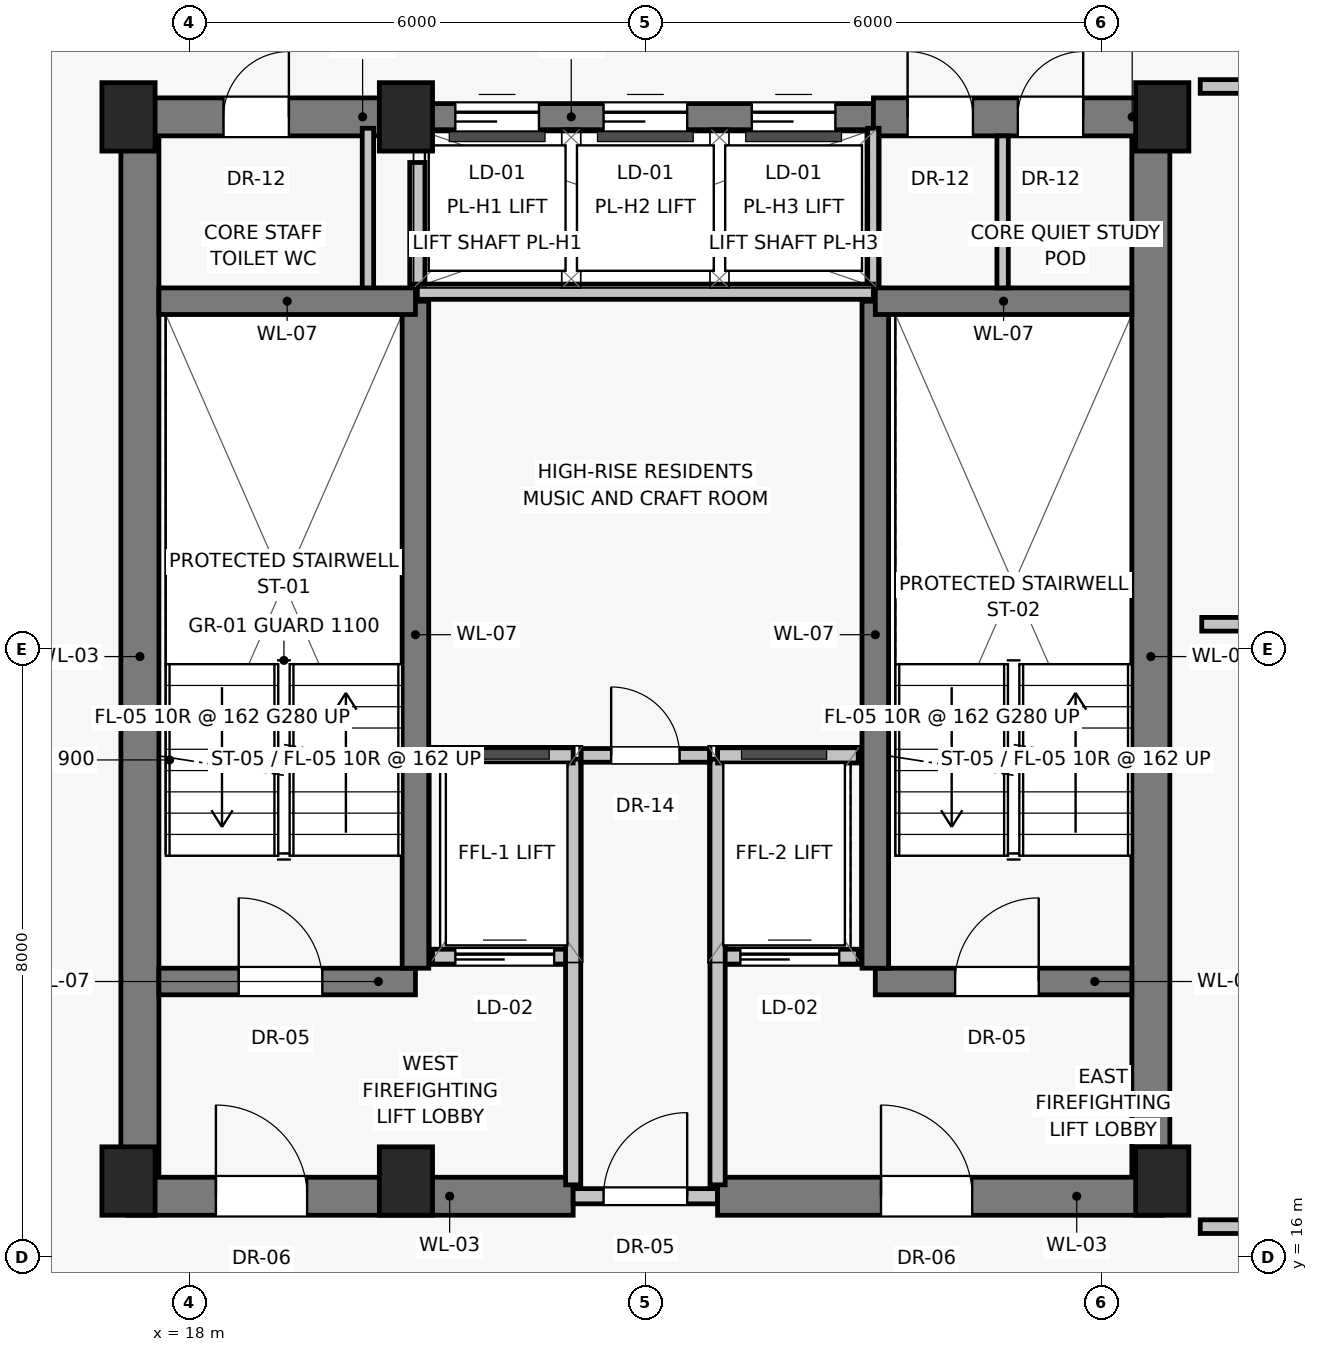
"""IFC4 building model, lengths in metres.
Left out: names, types, materials, properties, quantities, classifications, styles, units other than length and angle.
Written with IfcOpenShell. Run it as: python <this file> out.ifc"""

import sys

from ifc_helpers import new_model, si_unit, direction, frame, frame_2d, origin, origin_2d, place, context, subcontext, project, spatial, rectangle, extrude, source, transform, mapped, element, fill, save


model = new_model("IFC4")
c1 = context("Model", 3, precision=1e-05, world=origin(), true_north=direction((0.0, 1.0)))
c2 = subcontext(c1, "Body", "Model", "MODEL_VIEW")
j1 = project(units=[si_unit("LENGTHUNIT", "METRE"), si_unit("PLANEANGLEUNIT", "RADIAN")], contexts=[c1])
p1 = place(None, origin())
s1 = spatial("IfcSite", under=j1, at=p1, CompositionType="ELEMENT")
p2 = place(p1, origin())
s2 = spatial("IfcBuilding", under=s1, at=p2, CompositionType="ELEMENT")
p3 = place(p2, frame((0.0, 0.0, 185.35)))
s3 = spatial("IfcBuildingStorey", under=s2, at=p3, CompositionType="ELEMENT", Elevation=185.35)
for number, where, z_axis, x_axis in (
    (1, (17.2, 17.0, 0.0), (0.0, 0.0, 1.0), (1.0, 0.0, 0.0)),
    (2, (20.85, 17.0, 0.0), (0.0, 0.0, 1.0), (1.0, 0.0, 0.0)),
    (3, (30.8, 17.0, 0.0), (0.0, 0.0, 1.0), (1.0, 0.0, 0.0)),
    (4, (17.2, 31.0, 0.0), (0.0, 0.0, 1.0), (1.0, 0.0, 0.0)),
    (5, (20.85, 31.0, 0.0), (0.0, 0.0, 1.0), (1.0, 0.0, 0.0)),
    (6, (30.8, 31.0, 0.0), (0.0, 0.0, 1.0), (1.0, 0.0, 0.0)),
):
    element("IfcColumn", number, at=place(p3, frame(where, z_axis=z_axis, x_axis=x_axis)), inside=s3, PredefinedType="PILASTER", context=c2, shape_type="SweptSolid", body=[
        extrude(rectangle(XDim=0.7, YDim=0.9, at=origin_2d()), origin(), (0.0, 0.0, 1.0), 3.25),
    ])
for number, where, z_axis, x_axis in (
    (7, (17.35, 16.8, 0.0), (0.0, 0.0, 1.0), (0.0, 1.0, 0.0)),
    (8, (30.65, 16.8, 0.0), (0.0, 0.0, 1.0), (0.0, 1.0, 0.0)),
):
    element("IfcWall", number, at=place(p3, frame(where, z_axis=z_axis, x_axis=x_axis)), inside=s3, PredefinedType="SHEAR", context=c2, shape_type="SweptSolid", body=[
        extrude(rectangle(XDim=14.2, YDim=0.5, at=frame_2d((7.1, 0.0))), origin(), (0.0, 0.0, 1.0), 3.015),
    ])
p4 = place(p3, frame((17.2, 16.8, 0.0), z_axis=(0.0, 0.0, 1.0), x_axis=(1.0, 0.0, 0.0)))
e9 = element("IfcWall", 9, at=p4, inside=s3, PredefinedType="SHEAR", context=c2, shape_type="SweptSolid", body=[
    extrude(rectangle(XDim=5.85, YDim=0.5, at=frame_2d((2.925, 0.0))), origin(), (0.0, 0.0, 1.0), 3.015),
])
p5 = place(p4, frame((1.15, 0.0, 0.0)))
e10 = element("IfcOpeningElement", 10, at=p5, cuts=e9, PredefinedType="OPENING", context=c2, shape_type="SweptSolid", body=[
    extrude(rectangle(XDim=1.2, YDim=2.03, at=frame_2d((0.6, 1.015))), frame((0.0, 0.26, 0.0), z_axis=(0.0, -1.0, 0.0), x_axis=(1.0, 0.0, 0.0)), (0.0, 0.0, 1.0), 0.52),
])
p6 = place(p3, frame((23.05, 16.8, 0.0), z_axis=(0.0, 0.0, 1.0), x_axis=(1.0, 0.0, 0.0)))
e11 = element("IfcWall", 11, at=p6, inside=s3, PredefinedType="SOLIDWALL", context=c2, shape_type="SweptSolid", body=[
    extrude(rectangle(XDim=1.9, YDim=0.2, at=frame_2d((0.95, 0.0))), origin(), (0.0, 0.0, 1.0), 2.165),
])
p7 = place(p6, frame((0.4, 0.0, 0.0)))
e12 = element("IfcOpeningElement", 12, at=p7, cuts=e11, PredefinedType="OPENING", context=c2, shape_type="SweptSolid", body=[
    extrude(rectangle(XDim=1.1, YDim=2.03, at=frame_2d((0.55, 1.015))), frame((0.0, 0.11, 0.0), z_axis=(0.0, -1.0, 0.0), x_axis=(1.0, 0.0, 0.0)), (0.0, 0.0, 1.0), 0.22),
])
p8 = place(p3, frame((24.95, 16.8, 0.0), z_axis=(0.0, 0.0, 1.0), x_axis=(1.0, 0.0, 0.0)))
e13 = element("IfcWall", 13, at=p8, inside=s3, PredefinedType="SHEAR", context=c2, shape_type="SweptSolid", body=[
    extrude(rectangle(XDim=5.85, YDim=0.5, at=frame_2d((2.925, 0.0))), origin(), (0.0, 0.0, 1.0), 3.015),
])
p9 = place(p8, frame((2.15, 0.0, 0.0)))
e14 = element("IfcOpeningElement", 14, at=p9, cuts=e13, PredefinedType="OPENING", context=c2, shape_type="SweptSolid", body=[
    extrude(rectangle(XDim=1.2, YDim=2.03, at=frame_2d((0.6, 1.015))), frame((0.0, 0.26, 0.0), z_axis=(0.0, -1.0, 0.0), x_axis=(1.0, 0.0, 0.0)), (0.0, 0.0, 1.0), 0.52),
])
p10 = place(p3, frame((17.2, 31.0, 0.0), z_axis=(0.0, 0.0, 1.0), x_axis=(1.0, 0.0, 0.0)))
e15 = element("IfcWall", 15, at=p10, inside=s3, PredefinedType="SHEAR", context=c2, shape_type="SweptSolid", body=[
    extrude(rectangle(XDim=3.8, YDim=0.5, at=frame_2d((1.9, 0.0))), origin(), (0.0, 0.0, 1.0), 3.015),
])
p11 = place(p10, frame((1.25, 0.0, 0.0)))
e16 = element("IfcOpeningElement", 16, at=p11, cuts=e15, PredefinedType="OPENING", context=c2, shape_type="SweptSolid", body=[
    extrude(rectangle(XDim=0.86, YDim=2.01, at=frame_2d((0.43, 1.005))), frame((0.0, 0.26, 0.0), z_axis=(0.0, -1.0, 0.0), x_axis=(1.0, 0.0, 0.0)), (0.0, 0.0, 1.0), 0.52),
])
p12 = place(p3, frame((21.0, 31.0, 0.0), z_axis=(0.0, 0.0, 1.0), x_axis=(1.0, 0.0, 0.0)))
e17 = element("IfcWall", 17, at=p12, inside=s3, PredefinedType="SHEAR", context=c2, shape_type="SweptSolid", body=[
    extrude(rectangle(XDim=6.0, YDim=0.35, at=frame_2d((3.0, 0.0))), origin(), (0.0, 0.0, 1.0), 3.015),
])
p13 = place(p12, frame((0.5, 0.0, 0.0)))
e18 = element("IfcOpeningElement", 18, at=p13, cuts=e17, PredefinedType="OPENING", context=c2, shape_type="SweptSolid", body=[
    extrude(rectangle(XDim=1.1, YDim=2.08, at=frame_2d((0.55, 1.04))), frame((0.0, 0.185, 0.0), z_axis=(0.0, -1.0, 0.0), x_axis=(1.0, 0.0, 0.0)), (0.0, 0.0, 1.0), 0.37),
])
p14 = place(p12, frame((2.45, 0.0, 0.0)))
e19 = element("IfcOpeningElement", 19, at=p14, cuts=e17, PredefinedType="OPENING", context=c2, shape_type="SweptSolid", body=[
    extrude(rectangle(XDim=1.1, YDim=2.08, at=frame_2d((0.55, 1.04))), frame((0.0, 0.185, 0.0), z_axis=(0.0, -1.0, 0.0), x_axis=(1.0, 0.0, 0.0)), (0.0, 0.0, 1.0), 0.37),
])
p15 = place(p12, frame((4.4, 0.0, 0.0)))
e20 = element("IfcOpeningElement", 20, at=p15, cuts=e17, PredefinedType="OPENING", context=c2, shape_type="SweptSolid", body=[
    extrude(rectangle(XDim=1.1, YDim=2.08, at=frame_2d((0.55, 1.04))), frame((0.0, 0.185, 0.0), z_axis=(0.0, -1.0, 0.0), x_axis=(1.0, 0.0, 0.0)), (0.0, 0.0, 1.0), 0.37),
])
p16 = place(p3, frame((27.0, 31.0, 0.0), z_axis=(0.0, 0.0, 1.0), x_axis=(1.0, 0.0, 0.0)))
e21 = element("IfcWall", 21, at=p16, inside=s3, PredefinedType="SHEAR", context=c2, shape_type="SweptSolid", body=[
    extrude(rectangle(XDim=3.8, YDim=0.5, at=frame_2d((1.9, 0.0))), origin(), (0.0, 0.0, 1.0), 3.015),
])
p17 = place(p16, frame((0.45, 0.0, 0.0)))
e22 = element("IfcOpeningElement", 22, at=p17, cuts=e21, PredefinedType="OPENING", context=c2, shape_type="SweptSolid", body=[
    extrude(rectangle(XDim=0.86, YDim=2.01, at=frame_2d((0.43, 1.005))), frame((0.0, 0.26, 0.0), z_axis=(0.0, -1.0, 0.0), x_axis=(1.0, 0.0, 0.0)), (0.0, 0.0, 1.0), 0.52),
])
p18 = place(p16, frame((1.9, 0.0, 0.0)))
e23 = element("IfcOpeningElement", 23, at=p18, cuts=e21, PredefinedType="OPENING", context=c2, shape_type="SweptSolid", body=[
    extrude(rectangle(XDim=0.86, YDim=2.01, at=frame_2d((0.43, 1.005))), frame((0.0, 0.26, 0.0), z_axis=(0.0, -1.0, 0.0), x_axis=(1.0, 0.0, 0.0)), (0.0, 0.0, 1.0), 0.52),
])
for number, where, z_axis, x_axis in (
    (24, (20.35, 28.65, 0.0), (0.0, 0.0, 1.0), (0.0, 1.0, 0.0)),
    (25, (27.0, 28.65, 0.0), (0.0, 0.0, 1.0), (0.0, 1.0, 0.0)),
):
    element("IfcWall", number, at=place(p3, frame(where, z_axis=z_axis, x_axis=x_axis)), inside=s3, PredefinedType="PARTITIONING", context=c2, shape_type="SweptSolid", body=[
        extrude(rectangle(XDim=2.2, YDim=0.15, at=frame_2d((1.1, 0.0))), origin(), (0.0, 0.0, 1.0), 3.015),
    ])
p19 = place(p3, frame((17.6, 19.625, 0.0), z_axis=(0.0, 0.0, 1.0), x_axis=(1.0, 0.0, 0.0)))
e26 = element("IfcWall", 26, at=p19, inside=s3, PredefinedType="SHEAR", context=c2, shape_type="SweptSolid", body=[
    extrude(rectangle(XDim=3.375, YDim=0.35, at=frame_2d((1.688, 0.0))), origin(), (0.0, 0.0, 1.0), 3.015),
])
p20 = place(p19, frame((1.05, 0.0, 0.0)))
e27 = element("IfcOpeningElement", 27, at=p20, cuts=e26, PredefinedType="OPENING", context=c2, shape_type="SweptSolid", body=[
    extrude(rectangle(XDim=1.1, YDim=2.03, at=frame_2d((0.55, 1.015))), frame((0.0, 0.185, 0.0), z_axis=(0.0, -1.0, 0.0), x_axis=(1.0, 0.0, 0.0)), (0.0, 0.0, 1.0), 0.37),
])
p21 = place(p3, frame((21.2, 19.95, 0.0), z_axis=(0.0, 0.0, 1.0), x_axis=(1.0, 0.0, 0.0)))
e28 = element("IfcWall", 28, at=p21, inside=s3, PredefinedType="SOLIDWALL", context=c2, shape_type="SweptSolid", body=[
    extrude(rectangle(XDim=1.85, YDim=0.2, at=frame_2d((0.925, 0.0))), origin(), (0.0, 0.0, 1.0), 3.015),
])
p22 = place(p21, frame((0.3, 0.0, 0.0)))
e29 = element("IfcOpeningElement", 29, at=p22, cuts=e28, PredefinedType="OPENING", context=c2, shape_type="SweptSolid", body=[
    extrude(rectangle(XDim=1.3, YDim=2.25, at=frame_2d((0.65, 1.125))), frame((0.0, 0.11, 0.0), z_axis=(0.0, -1.0, 0.0), x_axis=(1.0, 0.0, 0.0)), (0.0, 0.0, 1.0), 0.22),
])
p23 = place(p3, frame((24.95, 19.95, 0.0), z_axis=(0.0, 0.0, 1.0), x_axis=(1.0, 0.0, 0.0)))
e30 = element("IfcWall", 30, at=p23, inside=s3, PredefinedType="SOLIDWALL", context=c2, shape_type="SweptSolid", body=[
    extrude(rectangle(XDim=1.85, YDim=0.2, at=frame_2d((0.925, 0.0))), origin(), (0.0, 0.0, 1.0), 3.015),
])
p24 = place(p23, frame((0.3, 0.0, 0.0)))
e31 = element("IfcOpeningElement", 31, at=p24, cuts=e30, PredefinedType="OPENING", context=c2, shape_type="SweptSolid", body=[
    extrude(rectangle(XDim=1.3, YDim=2.25, at=frame_2d((0.65, 1.125))), frame((0.0, 0.11, 0.0), z_axis=(0.0, -1.0, 0.0), x_axis=(1.0, 0.0, 0.0)), (0.0, 0.0, 1.0), 0.22),
])
p25 = place(p3, frame((27.025, 19.625, 0.0), z_axis=(0.0, 0.0, 1.0), x_axis=(1.0, 0.0, 0.0)))
e32 = element("IfcWall", 32, at=p25, inside=s3, PredefinedType="SHEAR", context=c2, shape_type="SweptSolid", body=[
    extrude(rectangle(XDim=3.375, YDim=0.35, at=frame_2d((1.688, 0.0))), origin(), (0.0, 0.0, 1.0), 3.015),
])
p26 = place(p25, frame((1.05, 0.0, 0.0)))
e33 = element("IfcOpeningElement", 33, at=p26, cuts=e32, PredefinedType="OPENING", context=c2, shape_type="SweptSolid", body=[
    extrude(rectangle(XDim=1.1, YDim=2.03, at=frame_2d((0.55, 1.015))), frame((0.0, 0.185, 0.0), z_axis=(0.0, -1.0, 0.0), x_axis=(1.0, 0.0, 0.0)), (0.0, 0.0, 1.0), 0.37),
])
for number, where, z_axis, x_axis in (
    (34, (20.975, 19.8, 0.0), (0.0, 0.0, 1.0), (0.0, 1.0, 0.0)),
    (35, (27.025, 19.8, 0.0), (0.0, 0.0, 1.0), (0.0, 1.0, 0.0)),
):
    element("IfcWall", number, at=place(p3, frame(where, z_axis=z_axis, x_axis=x_axis)), inside=s3, PredefinedType="SHEAR", context=c2, shape_type="SweptSolid", body=[
        extrude(rectangle(XDim=8.775, YDim=0.35, at=frame_2d((4.387, 0.0))), origin(), (0.0, 0.0, 1.0), 3.015),
    ])
for number, where, z_axis, x_axis in (
    (36, (17.6, 28.575, 0.0), (0.0, 0.0, 1.0), (1.0, 0.0, 0.0)),
    (37, (27.025, 28.575, 0.0), (0.0, 0.0, 1.0), (1.0, 0.0, 0.0)),
):
    element("IfcWall", number, at=place(p3, frame(where, z_axis=z_axis, x_axis=x_axis)), inside=s3, PredefinedType="SHEAR", context=c2, shape_type="SweptSolid", body=[
        extrude(rectangle(XDim=3.375, YDim=0.35, at=frame_2d((1.688, 0.0))), origin(), (0.0, 0.0, 1.0), 3.015),
    ])
for number, where, z_axis, x_axis in (
    (38, (23.05, 16.95, 0.0), (0.0, 0.0, 1.0), (0.0, 1.0, 0.0)),
    (39, (24.95, 16.95, 0.0), (0.0, 0.0, 1.0), (0.0, 1.0, 0.0)),
):
    element("IfcWall", number, at=place(p3, frame(where, z_axis=z_axis, x_axis=x_axis)), inside=s3, PredefinedType="SOLIDWALL", context=c2, shape_type="SweptSolid", body=[
        extrude(rectangle(XDim=5.6, YDim=0.2, at=frame_2d((2.8, 0.0))), origin(), (0.0, 0.0, 1.0), 3.015),
    ])
for number, where, z_axis, x_axis in (
    (40, (21.2, 22.6, 0.0), (0.0, 0.0, 1.0), (1.0, 0.0, 0.0)),
    (41, (24.95, 22.6, 0.0), (0.0, 0.0, 1.0), (1.0, 0.0, 0.0)),
):
    element("IfcWall", number, at=place(p3, frame(where, z_axis=z_axis, x_axis=x_axis)), inside=s3, PredefinedType="SOLIDWALL", context=c2, shape_type="SweptSolid", body=[
        extrude(rectangle(XDim=1.85, YDim=0.2, at=frame_2d((0.925, 0.0))), origin(), (0.0, 0.0, 1.0), 3.015),
    ])
p27 = place(p3, frame((21.0, 28.7, 0.0), z_axis=(0.0, 0.0, 1.0), x_axis=(1.0, 0.0, 0.0)))
e42 = element("IfcWall", 42, at=p27, inside=s3, PredefinedType="SOLIDWALL", context=c2, shape_type="SweptSolid", body=[
    extrude(rectangle(XDim=6.0, YDim=0.2, at=frame_2d((3.0, 0.0))), origin(), (0.0, 0.0, 1.0), 3.015),
])
p28 = place(p3, frame((21.0, 28.8, 0.0), z_axis=(0.0, 0.0, 1.0), x_axis=(0.0, 1.0, 0.0)))
e43 = element("IfcWall", 43, at=p28, inside=s3, PredefinedType="SOLIDWALL", context=c2, shape_type="SweptSolid", body=[
    extrude(rectangle(XDim=1.6, YDim=0.2, at=frame_2d((0.8, 0.0))), origin(), (0.0, 0.0, 1.0), 3.015),
])
p29 = place(p3, frame((23.15, 22.6, 0.0), z_axis=(0.0, 0.0, 1.0), x_axis=(1.0, 0.0, 0.0)))
e44 = element("IfcWall", 44, at=p29, inside=s3, PredefinedType="PARTITIONING", context=c2, shape_type="SweptSolid", body=[
    extrude(rectangle(XDim=1.7, YDim=0.18, at=frame_2d((0.85, 0.0))), origin(), (0.0, 0.0, 1.0), 3.015),
])
p30 = place(p29, frame((0.4, 0.0, 0.0)))
e45 = element("IfcOpeningElement", 45, at=p30, cuts=e44, PredefinedType="OPENING", context=c2, shape_type="SweptSolid", body=[
    extrude(rectangle(XDim=0.9, YDim=2.01, at=frame_2d((0.45, 1.005))), frame((0.0, 0.1, 0.0), z_axis=(0.0, -1.0, 0.0), x_axis=(1.0, 0.0, 0.0)), (0.0, 0.0, 1.0), 0.2),
])
p31 = place(p3, frame((28.7, 28.75, 0.0), z_axis=(0.0, 0.0, 1.0), x_axis=(0.0, 1.0, 0.0)))
e46 = element("IfcWall", 46, at=p31, inside=s3, PredefinedType="PARTITIONING", context=c2, shape_type="SweptSolid", body=[
    extrude(rectangle(XDim=2.0, YDim=0.15, at=frame_2d((1.0, 0.0))), origin(), (0.0, 0.0, 1.0), 3.015),
])
p32 = place(p3, frame((31.32, 24.325, 0.0), z_axis=(0.0, 0.0, 1.0), x_axis=(1.0, 0.0, 0.0)))
e47 = element("IfcWall", 47, at=p32, inside=s3, PredefinedType="PARTITIONING", context=c2, shape_type="SweptSolid", body=[
    extrude(rectangle(XDim=10.491, YDim=0.18, at=frame_2d((5.246, 0.0))), origin(), (0.0, 0.0, 1.0), 3.015),
])
p33 = place(p3, frame((31.3, 16.4, 0.0), z_axis=(0.0, 0.0, 1.0), x_axis=(1.0, 0.0, 0.0)))
e48 = element("IfcWall", 48, at=p33, inside=s3, PredefinedType="PARTITIONING", context=c2, shape_type="SweptSolid", body=[
    extrude(rectangle(XDim=1.92, YDim=0.18, at=frame_2d((0.96, 0.0))), origin(), (0.0, 0.0, 1.0), 3.015),
])
p34 = place(p33, frame((0.72, 0.0, 0.0)))
e49 = element("IfcOpeningElement", 49, at=p34, cuts=e48, PredefinedType="OPENING", context=c2, shape_type="SweptSolid", body=[
    extrude(rectangle(XDim=1.0, YDim=2.01, at=frame_2d((0.5, 1.005))), frame((0.0, 0.1, 0.0), z_axis=(0.0, -1.0, 0.0), x_axis=(1.0, 0.0, 0.0)), (0.0, 0.0, 1.0), 0.2),
])
p35 = place(p3, frame((31.3, 31.4, 0.0), z_axis=(0.0, 0.0, 1.0), x_axis=(1.0, 0.0, 0.0)))
e50 = element("IfcWall", 50, at=p35, inside=s3, PredefinedType="PARTITIONING", context=c2, shape_type="SweptSolid", body=[
    extrude(rectangle(XDim=1.92, YDim=0.18, at=frame_2d((0.96, 0.0))), origin(), (0.0, 0.0, 1.0), 3.015),
])
p36 = place(p35, frame((0.72, 0.0, 0.0)))
e51 = element("IfcOpeningElement", 51, at=p36, cuts=e50, PredefinedType="OPENING", context=c2, shape_type="SweptSolid", body=[
    extrude(rectangle(XDim=1.0, YDim=2.01, at=frame_2d((0.5, 1.005))), frame((0.0, 0.1, 0.0), z_axis=(0.0, -1.0, 0.0), x_axis=(1.0, 0.0, 0.0)), (0.0, 0.0, 1.0), 0.2),
])
m1 = source(origin(), c2, "Body", "SweptSolid", [
    extrude(rectangle(XDim=1.2, YDim=2.03, at=frame_2d((0.6, 1.015))), frame((0.0, 0.025, 0.0), z_axis=(0.0, -1.0, 0.0), x_axis=(1.0, 0.0, 0.0)), (0.0, 0.0, 1.0), 0.05),
])
p37 = place(p5, origin())
e52 = element("IfcDoor", 52, at=p37, inside=s3, OperationType="SINGLE_SWING_LEFT", PredefinedType="DOOR", context=c2, shape_type="MappedRepresentation", body=[
    mapped(m1, transform((0.0, 0.0, 0.0), scale=1.0)),
])
fill(e10, e52)
m2 = source(origin(), c2, "Body", "SweptSolid", [
    extrude(rectangle(XDim=1.1, YDim=2.03, at=frame_2d((0.55, 1.015))), frame((0.0, 0.025, 0.0), z_axis=(0.0, -1.0, 0.0), x_axis=(1.0, 0.0, 0.0)), (0.0, 0.0, 1.0), 0.05),
])
p38 = place(p7, origin())
e53 = element("IfcDoor", 53, at=p38, inside=s3, OperationType="SINGLE_SWING_RIGHT", PredefinedType="DOOR", context=c2, shape_type="MappedRepresentation", body=[
    mapped(m2, transform((0.0, 0.0, 0.0), scale=1.0)),
])
fill(e12, e53)
p39 = place(p9, origin())
e54 = element("IfcDoor", 54, at=p39, inside=s3, OperationType="SINGLE_SWING_LEFT", PredefinedType="DOOR", context=c2, shape_type="MappedRepresentation", body=[
    mapped(m1, transform((0.0, 0.0, 0.0), scale=1.0)),
])
fill(e14, e54)
m3 = source(origin(), c2, "Body", "SweptSolid", [
    extrude(rectangle(XDim=0.86, YDim=2.01, at=frame_2d((0.43, 1.005))), frame((0.0, 0.025, 0.0), z_axis=(0.0, -1.0, 0.0), x_axis=(1.0, 0.0, 0.0)), (0.0, 0.0, 1.0), 0.05),
])
p40 = place(p11, origin())
e55 = element("IfcDoor", 55, at=p40, inside=s3, OperationType="SINGLE_SWING_RIGHT", PredefinedType="DOOR", context=c2, shape_type="MappedRepresentation", body=[
    mapped(m3, transform((0.0, 0.0, 0.0), scale=1.0)),
])
fill(e16, e55)
m4 = source(origin(), c2, "Body", "SweptSolid", [
    extrude(rectangle(XDim=1.1, YDim=2.08, at=frame_2d((0.55, 1.04))), frame((0.0, 0.025, 0.0), z_axis=(0.0, -1.0, 0.0), x_axis=(1.0, 0.0, 0.0)), (0.0, 0.0, 1.0), 0.05),
])
p41 = place(p13, origin())
e56 = element("IfcDoor", 56, at=p41, inside=s3, OperationType="SLIDING_TO_LEFT", PredefinedType="DOOR", context=c2, shape_type="MappedRepresentation", body=[
    mapped(m4, transform((0.0, 0.0, 0.0), scale=1.0)),
])
fill(e18, e56)
p42 = place(p14, origin())
e57 = element("IfcDoor", 57, at=p42, inside=s3, OperationType="SLIDING_TO_LEFT", PredefinedType="DOOR", context=c2, shape_type="MappedRepresentation", body=[
    mapped(m4, transform((0.0, 0.0, 0.0), scale=1.0)),
])
fill(e19, e57)
p43 = place(p15, origin())
e58 = element("IfcDoor", 58, at=p43, inside=s3, OperationType="SLIDING_TO_LEFT", PredefinedType="DOOR", context=c2, shape_type="MappedRepresentation", body=[
    mapped(m4, transform((0.0, 0.0, 0.0), scale=1.0)),
])
fill(e20, e58)
p44 = place(p17, origin())
e59 = element("IfcDoor", 59, at=p44, inside=s3, OperationType="SINGLE_SWING_LEFT", PredefinedType="DOOR", context=c2, shape_type="MappedRepresentation", body=[
    mapped(m3, transform((0.0, 0.0, 0.0), scale=1.0)),
])
fill(e22, e59)
p45 = place(p18, origin())
e60 = element("IfcDoor", 60, at=p45, inside=s3, OperationType="SINGLE_SWING_RIGHT", PredefinedType="DOOR", context=c2, shape_type="MappedRepresentation", body=[
    mapped(m3, transform((0.0, 0.0, 0.0), scale=1.0)),
])
fill(e23, e60)
p46 = place(p20, origin())
e61 = element("IfcDoor", 61, at=p46, inside=s3, OperationType="SINGLE_SWING_LEFT", PredefinedType="DOOR", context=c2, shape_type="MappedRepresentation", body=[
    mapped(m2, transform((0.0, 0.0, 0.0), scale=1.0)),
])
fill(e27, e61)
m5 = source(origin(), c2, "Body", "SweptSolid", [
    extrude(rectangle(XDim=1.3, YDim=2.25, at=frame_2d((0.65, 1.125))), frame((0.0, 0.025, 0.0), z_axis=(0.0, -1.0, 0.0), x_axis=(1.0, 0.0, 0.0)), (0.0, 0.0, 1.0), 0.05),
])
p47 = place(p22, origin())
e62 = element("IfcDoor", 62, at=p47, inside=s3, OperationType="SLIDING_TO_LEFT", PredefinedType="DOOR", context=c2, shape_type="MappedRepresentation", body=[
    mapped(m5, transform((0.0, 0.0, 0.0), scale=1.0)),
])
fill(e29, e62)
p48 = place(p24, origin())
e63 = element("IfcDoor", 63, at=p48, inside=s3, OperationType="SLIDING_TO_LEFT", PredefinedType="DOOR", context=c2, shape_type="MappedRepresentation", body=[
    mapped(m5, transform((0.0, 0.0, 0.0), scale=1.0)),
])
fill(e31, e63)
p49 = place(p26, origin())
e64 = element("IfcDoor", 64, at=p49, inside=s3, OperationType="SINGLE_SWING_RIGHT", PredefinedType="DOOR", context=c2, shape_type="MappedRepresentation", body=[
    mapped(m2, transform((0.0, 0.0, 0.0), scale=1.0)),
])
fill(e33, e64)
m6 = source(origin(), c2, "Body", "SweptSolid", [
    extrude(rectangle(XDim=0.9, YDim=2.01, at=frame_2d((0.45, 1.005))), frame((0.0, 0.025, 0.0), z_axis=(0.0, -1.0, 0.0), x_axis=(1.0, 0.0, 0.0)), (0.0, 0.0, 1.0), 0.05),
])
p50 = place(p30, origin())
e65 = element("IfcDoor", 65, at=p50, inside=s3, OperationType="SINGLE_SWING_LEFT", PredefinedType="DOOR", context=c2, shape_type="MappedRepresentation", body=[
    mapped(m6, transform((0.0, 0.0, 0.0), scale=1.0)),
])
fill(e45, e65)
save(model, sys.argv[1])
